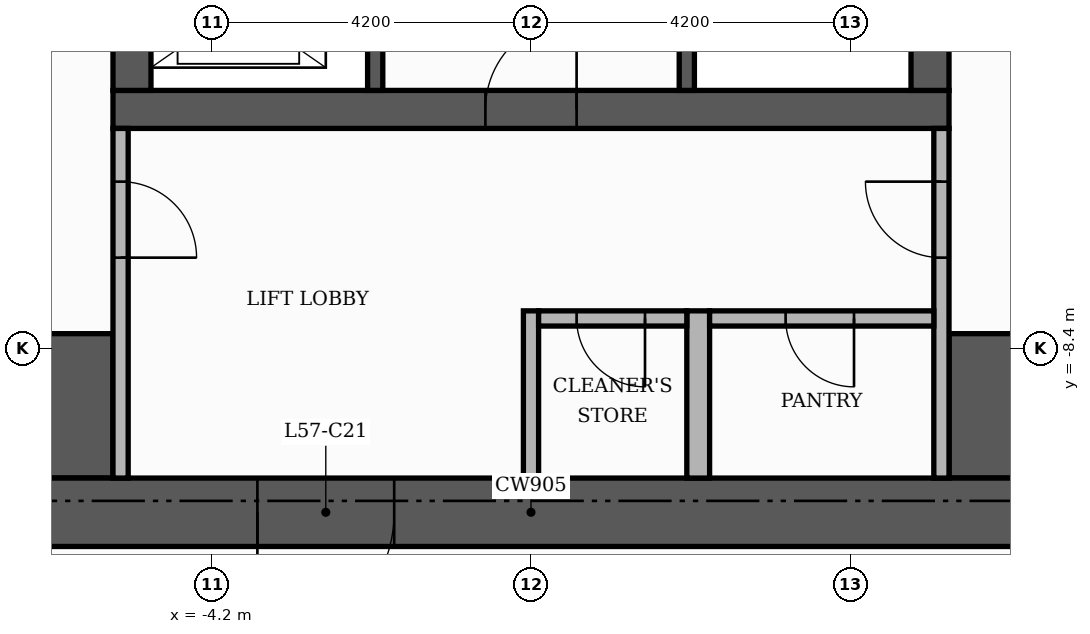
"""IFC4 building model, lengths in metres.
Left out: names, types, materials, properties, quantities, classifications, styles, units other than length and angle.
Written with IfcOpenShell. Run it as: python <this file> out.ifc"""

import sys

from ifc_helpers import new_model, si_unit, direction, frame, frame_2d, origin, place, context, subcontext, project, spatial, rectangle, extrude, element, fill, save


model = new_model("IFC4")
c1 = context("Model", 3, precision=1e-05, world=origin(), true_north=direction((0.0, 1.0)))
c2 = subcontext(c1, "Body", "Model", "MODEL_VIEW")
j1 = project(units=[si_unit("LENGTHUNIT", "METRE"), si_unit("PLANEANGLEUNIT", "RADIAN")], contexts=[c1])
p1 = place(None, origin())
s1 = spatial("IfcSite", under=j1, at=p1, CompositionType="ELEMENT")
p2 = place(p1, origin())
s2 = spatial("IfcBuilding", under=s1, at=p2, CompositionType="ELEMENT")
p3 = place(p2, frame((0.0, 0.0, 240.6)))
s3 = spatial("IfcBuildingStorey", under=s2, at=p3, CompositionType="ELEMENT", Elevation=240.6)
p4 = place(p3, frame((-5.5, -5.25, 0.0), z_axis=(0.0, 0.0, 1.0), x_axis=(1.0, 0.0, 0.0)))
e1 = element("IfcWall", 1, at=p4, inside=s3, PredefinedType="SHEAR", context=c2, shape_type="SweptSolid", body=[
    extrude(rectangle(XDim=11.0, YDim=0.5, at=frame_2d((5.5, 0.0))), origin(), (0.0, 0.0, 1.0), 3.48),
])
p5 = place(p4, frame((4.9, 0.0, 0.0)))
e2 = element("IfcOpeningElement", 2, at=p5, cuts=e1, PredefinedType="OPENING", context=c2, shape_type="SweptSolid", body=[
    extrude(rectangle(XDim=1.2, YDim=2.1, at=frame_2d((0.6, 1.05))), frame((0.0, 0.26, 0.0), z_axis=(0.0, -1.0, 0.0), x_axis=(1.0, 0.0, 0.0)), (0.0, 0.0, 1.0), 0.52),
])
for number, where, z_axis, x_axis in (
    (3, (-5.25, -5.0, 0.0), (0.0, 0.0, 1.0), (0.0, 1.0, 0.0)),
    (4, (5.25, -5.0, 0.0), (0.0, 0.0, 1.0), (0.0, 1.0, 0.0)),
):
    element("IfcWall", number, at=place(p3, frame(where, z_axis=z_axis, x_axis=x_axis)), inside=s3, PredefinedType="SHEAR", context=c2, shape_type="SweptSolid", body=[
        extrude(rectangle(XDim=10.5, YDim=0.5, at=frame_2d((5.25, 0.0))), origin(), (0.0, 0.0, 1.0), 3.48),
    ])
for number, where, z_axis, x_axis in (
    (5, (-10.1, -9.15, 0.0), (0.0, 0.0, 1.0), (1.0, 0.0, 0.0)),
    (6, (5.5, -9.15, 0.0), (0.0, 0.0, 1.0), (1.0, 0.0, 0.0)),
):
    element("IfcWall", number, at=place(p3, frame(where, z_axis=z_axis, x_axis=x_axis)), inside=s3, PredefinedType="SHEAR", context=c2, shape_type="SweptSolid", body=[
        extrude(rectangle(XDim=4.6, YDim=1.9, at=frame_2d((2.3, 0.0))), origin(), (0.0, 0.0, 1.0), 3.48),
    ])
p6 = place(p3, frame((2.05, -5.0, 0.0), z_axis=(0.0, 0.0, 1.0), x_axis=(0.0, 1.0, 0.0)))
e7 = element("IfcWall", 7, at=p6, inside=s3, PredefinedType="SHEAR", context=c2, shape_type="SweptSolid", body=[
    extrude(rectangle(XDim=6.6, YDim=0.2, at=frame_2d((3.3, 0.0))), origin(), (0.0, 0.0, 1.0), 3.48),
])
p7 = place(p6, frame((5.25, 0.0, 0.0)))
e8 = element("IfcOpeningElement", 8, at=p7, cuts=e7, PredefinedType="OPENING", context=c2, shape_type="SweptSolid", body=[
    extrude(rectangle(XDim=1.0, YDim=2.1, at=frame_2d((0.5, 1.05))), frame((0.0, 0.11, 0.0), z_axis=(0.0, -1.0, 0.0), x_axis=(1.0, 0.0, 0.0)), (0.0, 0.0, 1.0), 0.22),
])
p8 = place(p3, frame((-2.05, -5.0, 0.0), z_axis=(0.0, 0.0, 1.0), x_axis=(0.0, 1.0, 0.0)))
e9 = element("IfcWall", 9, at=p8, inside=s3, PredefinedType="SHEAR", context=c2, shape_type="SweptSolid", body=[
    extrude(rectangle(XDim=3.4, YDim=0.2, at=frame_2d((1.7, 0.0))), origin(), (0.0, 0.0, 1.0), 3.48),
])
p9 = place(p8, frame((0.55, 0.0, 0.0)))
e10 = element("IfcOpeningElement", 10, at=p9, cuts=e9, PredefinedType="OPENING", context=c2, shape_type="SweptSolid", body=[
    extrude(rectangle(XDim=1.1, YDim=2.1, at=frame_2d((0.55, 1.05))), frame((0.0, 0.11, 0.0), z_axis=(0.0, -1.0, 0.0), x_axis=(1.0, 0.0, 0.0)), (0.0, 0.0, 1.0), 0.22),
])
p10 = place(p8, frame((2.45, 0.0, 0.0)))
e11 = element("IfcOpeningElement", 11, at=p10, cuts=e9, PredefinedType="OPENING", context=c2, shape_type="SweptSolid", body=[
    extrude(rectangle(XDim=0.8, YDim=2.1, at=frame_2d((0.4, 1.05))), frame((0.0, 0.11, 0.0), z_axis=(0.0, -1.0, 0.0), x_axis=(1.0, 0.0, 0.0)), (0.0, 0.0, 1.0), 0.22),
])
p11 = place(p3, frame((-11.0, -10.55, 0.0), z_axis=(0.0, 0.0, 1.0), x_axis=(1.0, 0.0, 0.0)))
e12 = element("IfcWall", 12, at=p11, inside=s3, PredefinedType="SHEAR", context=c2, shape_type="SweptSolid", body=[
    extrude(rectangle(XDim=22.0, YDim=0.9, at=frame_2d((11.0, 0.0))), origin(), (0.0, 0.0, 1.0), 3.48),
])
p12 = place(p11, frame((7.4, 0.0, 0.0)))
e13 = element("IfcOpeningElement", 13, at=p12, cuts=e12, PredefinedType="OPENING", context=c2, shape_type="SweptSolid", body=[
    extrude(rectangle(XDim=1.8, YDim=2.2, at=frame_2d((0.9, 1.1))), frame((0.0, 0.46, 0.0), z_axis=(0.0, -1.0, 0.0), x_axis=(1.0, 0.0, 0.0)), (0.0, 0.0, 1.0), 0.92),
])
p13 = place(p3, frame((-5.4, -10.1, 0.0), z_axis=(0.0, 0.0, 1.0), x_axis=(0.0, 1.0, 0.0)))
e14 = element("IfcWall", 14, at=p13, inside=s3, PredefinedType="PARTITIONING", context=c2, shape_type="SweptSolid", body=[
    extrude(rectangle(XDim=4.6, YDim=0.2, at=frame_2d((2.3, 0.0))), origin(), (0.0, 0.0, 1.0), 3.48),
])
p14 = place(p13, frame((2.9, 0.0, 0.0)))
e15 = element("IfcOpeningElement", 15, at=p14, cuts=e14, PredefinedType="OPENING", context=c2, shape_type="SweptSolid", body=[
    extrude(rectangle(XDim=1.0, YDim=2.1, at=frame_2d((0.5, 1.05))), frame((0.0, 0.11, 0.0), z_axis=(0.0, -1.0, 0.0), x_axis=(1.0, 0.0, 0.0)), (0.0, 0.0, 1.0), 0.22),
])
p15 = place(p3, frame((0.0, -10.1, 0.0), z_axis=(0.0, 0.0, 1.0), x_axis=(0.0, 1.0, 0.0)))
e16 = element("IfcWall", 16, at=p15, inside=s3, PredefinedType="PARTITIONING", context=c2, shape_type="SweptSolid", body=[
    extrude(rectangle(XDim=2.2, YDim=0.2, at=frame_2d((1.1, 0.0))), origin(), (0.0, 0.0, 1.0), 3.48),
])
p16 = place(p3, frame((2.2, -10.1, 0.0), z_axis=(0.0, 0.0, 1.0), x_axis=(0.0, 1.0, 0.0)))
e17 = element("IfcWall", 17, at=p16, inside=s3, PredefinedType="PARTITIONING", context=c2, shape_type="SweptSolid", body=[
    extrude(rectangle(XDim=2.2, YDim=0.3, at=frame_2d((1.1, 0.0))), origin(), (0.0, 0.0, 1.0), 3.48),
])
p17 = place(p3, frame((5.4, -10.1, 0.0), z_axis=(0.0, 0.0, 1.0), x_axis=(0.0, 1.0, 0.0)))
e18 = element("IfcWall", 18, at=p17, inside=s3, PredefinedType="PARTITIONING", context=c2, shape_type="SweptSolid", body=[
    extrude(rectangle(XDim=4.6, YDim=0.2, at=frame_2d((2.3, 0.0))), origin(), (0.0, 0.0, 1.0), 3.48),
])
p18 = place(p17, frame((2.9, 0.0, 0.0)))
e19 = element("IfcOpeningElement", 19, at=p18, cuts=e18, PredefinedType="OPENING", context=c2, shape_type="SweptSolid", body=[
    extrude(rectangle(XDim=1.0, YDim=2.1, at=frame_2d((0.5, 1.05))), frame((0.0, 0.11, 0.0), z_axis=(0.0, -1.0, 0.0), x_axis=(1.0, 0.0, 0.0)), (0.0, 0.0, 1.0), 0.22),
])
p19 = place(p3, frame((0.1, -8.0, 0.0), z_axis=(0.0, 0.0, 1.0), x_axis=(1.0, 0.0, 0.0)))
e20 = element("IfcWall", 20, at=p19, inside=s3, PredefinedType="PARTITIONING", context=c2, shape_type="SweptSolid", body=[
    extrude(rectangle(XDim=1.95, YDim=0.2, at=frame_2d((0.975, 0.0))), origin(), (0.0, 0.0, 1.0), 3.48),
])
p20 = place(p19, frame((0.5, 0.0, 0.0)))
e21 = element("IfcOpeningElement", 21, at=p20, cuts=e20, PredefinedType="OPENING", context=c2, shape_type="SweptSolid", body=[
    extrude(rectangle(XDim=0.9, YDim=2.1, at=frame_2d((0.45, 1.05))), frame((0.0, 0.11, 0.0), z_axis=(0.0, -1.0, 0.0), x_axis=(1.0, 0.0, 0.0)), (0.0, 0.0, 1.0), 0.22),
])
p21 = place(p3, frame((2.35, -8.0, 0.0), z_axis=(0.0, 0.0, 1.0), x_axis=(1.0, 0.0, 0.0)))
e22 = element("IfcWall", 22, at=p21, inside=s3, PredefinedType="PARTITIONING", context=c2, shape_type="SweptSolid", body=[
    extrude(rectangle(XDim=2.95, YDim=0.2, at=frame_2d((1.475, 0.0))), origin(), (0.0, 0.0, 1.0), 3.48),
])
p22 = place(p21, frame((1.0, 0.0, 0.0)))
e23 = element("IfcOpeningElement", 23, at=p22, cuts=e22, PredefinedType="OPENING", context=c2, shape_type="SweptSolid", body=[
    extrude(rectangle(XDim=0.9, YDim=2.1, at=frame_2d((0.45, 1.05))), frame((0.0, 0.11, 0.0), z_axis=(0.0, -1.0, 0.0), x_axis=(1.0, 0.0, 0.0)), (0.0, 0.0, 1.0), 0.22),
])
p23 = place(p5, origin())
e24 = element("IfcDoor", 24, at=p23, inside=s3, OperationType="SINGLE_SWING_RIGHT", PredefinedType="DOOR", context=c2, shape_type="SweptSolid", body=[
    extrude(rectangle(XDim=1.2, YDim=2.1, at=frame_2d((0.6, 1.05))), frame((0.0, 0.025, 0.0), z_axis=(0.0, -1.0, 0.0), x_axis=(1.0, 0.0, 0.0)), (0.0, 0.0, 1.0), 0.05),
])
fill(e2, e24)
p24 = place(p14, frame((1.0, 0.0, 0.0), z_axis=(0.0, 0.0, 1.0), x_axis=(-1.0, 0.0, 0.0)))
e25 = element("IfcDoor", 25, at=p24, inside=s3, OperationType="SINGLE_SWING_LEFT", PredefinedType="DOOR", context=c2, shape_type="SweptSolid", body=[
    extrude(rectangle(XDim=1.0, YDim=2.1, at=frame_2d((0.5, 1.05))), frame((0.0, 0.025, 0.0), z_axis=(0.0, -1.0, 0.0), x_axis=(1.0, 0.0, 0.0)), (0.0, 0.0, 1.0), 0.05),
])
fill(e15, e25)
p25 = place(p18, origin())
e26 = element("IfcDoor", 26, at=p25, inside=s3, OperationType="SINGLE_SWING_RIGHT", PredefinedType="DOOR", context=c2, shape_type="SweptSolid", body=[
    extrude(rectangle(XDim=1.0, YDim=2.1, at=frame_2d((0.5, 1.05))), frame((0.0, 0.025, 0.0), z_axis=(0.0, -1.0, 0.0), x_axis=(1.0, 0.0, 0.0)), (0.0, 0.0, 1.0), 0.05),
])
fill(e19, e26)
p26 = place(p12, frame((1.8, 0.0, 0.0), z_axis=(0.0, 0.0, 1.0), x_axis=(-1.0, 0.0, 0.0)))
e27 = element("IfcDoor", 27, at=p26, inside=s3, OperationType="DOUBLE_DOOR_SINGLE_SWING", PredefinedType="DOOR", context=c2, shape_type="SweptSolid", body=[
    extrude(rectangle(XDim=1.8, YDim=2.2, at=frame_2d((0.9, 1.1))), frame((0.0, 0.025, 0.0), z_axis=(0.0, -1.0, 0.0), x_axis=(1.0, 0.0, 0.0)), (0.0, 0.0, 1.0), 0.05),
])
fill(e13, e27)
p27 = place(p20, frame((0.9, 0.0, 0.0), z_axis=(0.0, 0.0, 1.0), x_axis=(-1.0, 0.0, 0.0)))
e28 = element("IfcDoor", 28, at=p27, inside=s3, OperationType="SINGLE_SWING_RIGHT", PredefinedType="DOOR", context=c2, shape_type="SweptSolid", body=[
    extrude(rectangle(XDim=0.9, YDim=2.1, at=frame_2d((0.45, 1.05))), frame((0.0, 0.025, 0.0), z_axis=(0.0, -1.0, 0.0), x_axis=(1.0, 0.0, 0.0)), (0.0, 0.0, 1.0), 0.05),
])
fill(e21, e28)
p28 = place(p22, frame((0.9, 0.0, 0.0), z_axis=(0.0, 0.0, 1.0), x_axis=(-1.0, 0.0, 0.0)))
e29 = element("IfcDoor", 29, at=p28, inside=s3, OperationType="SINGLE_SWING_RIGHT", PredefinedType="DOOR", context=c2, shape_type="SweptSolid", body=[
    extrude(rectangle(XDim=0.9, YDim=2.1, at=frame_2d((0.45, 1.05))), frame((0.0, 0.025, 0.0), z_axis=(0.0, -1.0, 0.0), x_axis=(1.0, 0.0, 0.0)), (0.0, 0.0, 1.0), 0.05),
])
fill(e23, e29)
save(model, sys.argv[1])
